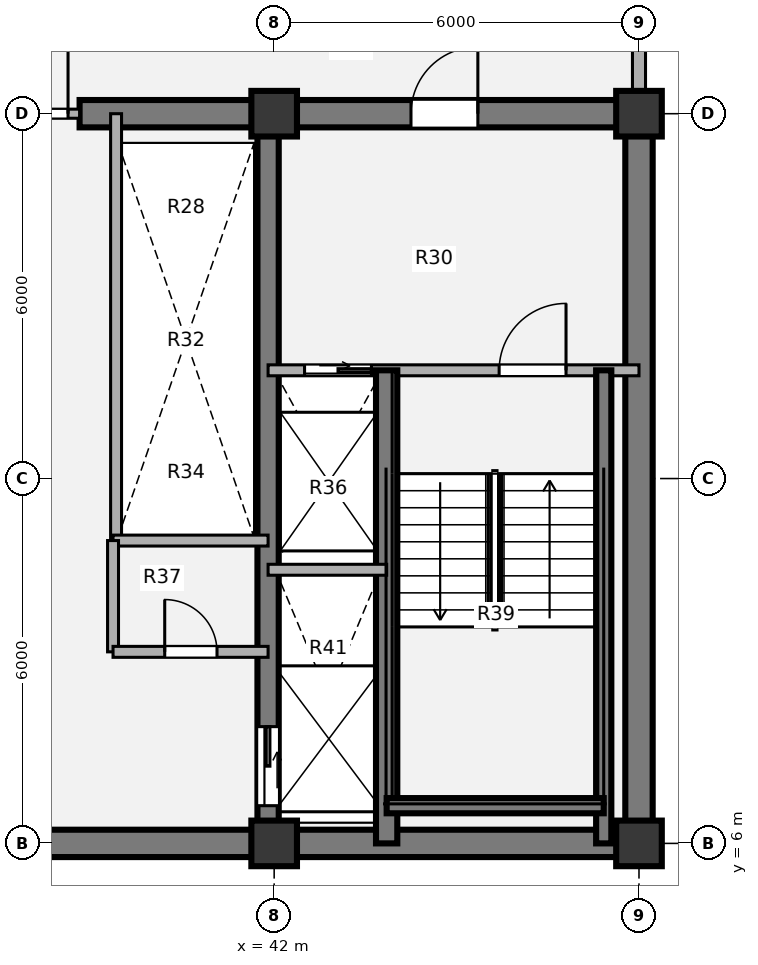
"""IFC4 building model, lengths in metres.
Left out: names, types, materials, properties, quantities, classifications, styles, units other than length and angle.
Written with IfcOpenShell. Run it as: python <this file> out.ifc"""

import sys

from ifc_helpers import new_model, si_unit, direction, frame, frame_2d, origin, origin_2d, place, context, subcontext, project, spatial, rectangle, extrude, source, transform, mapped, element, fill, save


model = new_model("IFC4")
c1 = context("Model", 3, precision=1e-05, world=origin(), true_north=direction((0.0, 1.0)))
c2 = subcontext(c1, "Body", "Model", "MODEL_VIEW")
j1 = project(units=[si_unit("LENGTHUNIT", "METRE"), si_unit("PLANEANGLEUNIT", "RADIAN")], contexts=[c1])
p1 = place(None, origin())
s1 = spatial("IfcSite", under=j1, at=p1, CompositionType="ELEMENT")
p2 = place(p1, origin())
s2 = spatial("IfcBuilding", under=s1, at=p2, CompositionType="ELEMENT")
p3 = place(p2, frame((0.0, 0.0, 167.76)))
s3 = spatial("IfcBuildingStorey", under=s2, at=p3, CompositionType="ELEMENT", Elevation=167.76)
m1 = source(origin(), c2, "Body", "SweptSolid", [
    extrude(rectangle(XDim=0.75, YDim=0.75, at=origin_2d()), origin(), (0.0, 0.0, 1.0), 3.78),
])
for number, where, z_axis, x_axis in (
    (1, (42.0, 6.0, 0.0), (0.0, 0.0, 1.0), (1.0, 0.0, 0.0)),
    (2, (48.0, 6.0, 0.0), (0.0, 0.0, 1.0), (1.0, 0.0, 0.0)),
    (3, (42.0, 18.0, 0.0), (0.0, 0.0, 1.0), (1.0, 0.0, 0.0)),
    (4, (48.0, 18.0, 0.0), (0.0, 0.0, 1.0), (1.0, 0.0, 0.0)),
):
    element("IfcColumn", number, at=place(p3, frame(where, z_axis=z_axis, x_axis=x_axis)), inside=s3, PredefinedType="COLUMN", context=c2, shape_type="MappedRepresentation", body=[
        mapped(m1, transform((0.0, 0.0, 0.0), x_axis=(1.0, 0.0, 0.0), y_axis=(0.0, 1.0, 0.0), z_axis=(0.0, 0.0, 1.0), scale=1.0)),
    ])
p4 = place(p3, frame((48.225, 6.0, 0.0), z_axis=(0.0, 0.0, 1.0), x_axis=(-1.0, 0.0, 0.0)))
e5 = element("IfcWall", 5, at=p4, inside=s3, PredefinedType="SHEAR", context=c2, shape_type="SweptSolid", body=[
    extrude(rectangle(XDim=24.45, YDim=0.45, at=frame_2d((12.225, 0.0))), origin(), (0.0, 0.0, 1.0), 3.78),
])
p5 = place(p3, frame((48.0, 18.0, 0.0), z_axis=(0.0, 0.0, 1.0), x_axis=(0.0, -1.0, 0.0)))
e6 = element("IfcWall", 6, at=p5, inside=s3, PredefinedType="SHEAR", context=c2, shape_type="SweptSolid", body=[
    extrude(rectangle(XDim=12.0, YDim=0.45, at=frame_2d((6.0, 0.0))), origin(), (0.0, 0.0, 1.0), 3.78),
])
p6 = place(p3, frame((38.8, 18.0, 0.0), z_axis=(0.0, 0.0, 1.0), x_axis=(1.0, 0.0, 0.0)))
e7 = element("IfcWall", 7, at=p6, inside=s3, PredefinedType="SHEAR", context=c2, shape_type="SweptSolid", body=[
    extrude(rectangle(XDim=9.425, YDim=0.45, at=frame_2d((4.712, 0.0))), origin(), (0.0, 0.0, 1.0), 3.78),
])
p7 = place(p6, frame((5.45, 0.0, 0.0)))
e8 = element("IfcOpeningElement", 8, at=p7, cuts=e7, PredefinedType="OPENING", context=c2, shape_type="SweptSolid", body=[
    extrude(rectangle(XDim=1.1, YDim=2.1, at=origin_2d()), frame((0.55, 0.235, 1.05), z_axis=(0.0, -1.0, 0.0), x_axis=(1.0, 0.0, 0.0)), (0.0, 0.0, 1.0), 0.47),
])
p8 = place(p3, frame((41.9, 18.0, 0.0), z_axis=(0.0, 0.0, 1.0), x_axis=(0.0, -1.0, 0.0)))
e9 = element("IfcWall", 9, at=p8, inside=s3, PredefinedType="SHEAR", context=c2, shape_type="SweptSolid", body=[
    extrude(rectangle(XDim=12.0, YDim=0.35, at=frame_2d((6.0, 0.0))), origin(), (0.0, 0.0, 1.0), 3.78),
])
p9 = place(p8, frame((10.08, 0.0, 0.0)))
e10 = element("IfcOpeningElement", 10, at=p9, cuts=e9, PredefinedType="OPENING", context=c2, shape_type="SweptSolid", body=[
    extrude(rectangle(XDim=1.3, YDim=2.1, at=origin_2d()), frame((0.65, 0.185, 1.05), z_axis=(0.0, -1.0, 0.0), x_axis=(1.0, 0.0, 0.0)), (0.0, 0.0, 1.0), 0.37),
])
p10 = place(p3, frame((48.0, 21.05, 0.0), z_axis=(0.0, 0.0, 1.0), x_axis=(0.0, -1.0, 0.0)))
e11 = element("IfcWall", 11, at=p10, inside=s3, PredefinedType="SOLIDWALL", context=c2, shape_type="SweptSolid", body=[
    extrude(rectangle(XDim=2.695, YDim=0.215, at=frame_2d((1.348, 0.0))), origin(), (0.0, 0.0, 1.0), 2.718),
])
p11 = place(p3, frame((39.4, 11.0, 0.0), z_axis=(0.0, 0.0, 1.0), x_axis=(0.0, 1.0, 0.0)))
e12 = element("IfcWall", 12, at=p11, inside=s3, PredefinedType="PARTITIONING", context=c2, shape_type="SweptSolid", body=[
    extrude(rectangle(XDim=7.0, YDim=0.18, at=frame_2d((3.5, 0.0))), origin(), (0.0, 0.0, 1.0), 3.5),
])
p12 = place(p3, frame((39.35, 10.98, 0.0), z_axis=(0.0, 0.0, 1.0), x_axis=(1.0, 0.0, 0.0)))
e13 = element("IfcWall", 13, at=p12, inside=s3, PredefinedType="PARTITIONING", context=c2, shape_type="SweptSolid", body=[
    extrude(rectangle(XDim=2.55, YDim=0.18, at=frame_2d((1.275, 0.0))), origin(), (0.0, 0.0, 1.0), 3.5),
])
p13 = place(p3, frame((39.35, 9.15, 0.0), z_axis=(0.0, 0.0, 1.0), x_axis=(0.0, 1.0, 0.0)))
e14 = element("IfcWall", 14, at=p13, inside=s3, PredefinedType="PARTITIONING", context=c2, shape_type="SweptSolid", body=[
    extrude(rectangle(XDim=1.83, YDim=0.18, at=frame_2d((0.915, 0.0))), origin(), (0.0, 0.0, 1.0), 3.5),
])
p14 = place(p3, frame((39.35, 9.15, 0.0), z_axis=(0.0, 0.0, 1.0), x_axis=(1.0, 0.0, 0.0)))
e15 = element("IfcWall", 15, at=p14, inside=s3, PredefinedType="PARTITIONING", context=c2, shape_type="SweptSolid", body=[
    extrude(rectangle(XDim=2.55, YDim=0.18, at=frame_2d((1.275, 0.0))), origin(), (0.0, 0.0, 1.0), 3.5),
])
p15 = place(p14, frame((0.85, 0.0, 0.0)))
e16 = element("IfcOpeningElement", 16, at=p15, cuts=e15, PredefinedType="OPENING", context=c2, shape_type="SweptSolid", body=[
    extrude(rectangle(XDim=0.86, YDim=2.1, at=origin_2d()), frame((0.43, 0.1, 1.05), z_axis=(0.0, -1.0, 0.0), x_axis=(1.0, 0.0, 0.0)), (0.0, 0.0, 1.0), 0.2),
])
p16 = place(p3, frame((33.2, 18.0, 0.0), z_axis=(0.0, 0.0, 1.0), x_axis=(1.0, 0.0, 0.0)))
e17 = element("IfcWall", 17, at=p16, inside=s3, PredefinedType="PARTITIONING", context=c2, shape_type="SweptSolid", body=[
    extrude(rectangle(XDim=5.6, YDim=0.15, at=frame_2d((2.8, 0.0))), origin(), (0.0, 0.0, 1.0), 2.515),
])
p17 = place(p16, frame((0.19, 0.0, 0.0)))
e18 = element("IfcOpeningElement", 18, at=p17, cuts=e17, PredefinedType="OPENING", context=c2, shape_type="SweptSolid", body=[
    extrude(rectangle(XDim=1.1, YDim=2.1, at=origin_2d()), frame((0.55, 0.085, 1.05), z_axis=(0.0, -1.0, 0.0), x_axis=(1.0, 0.0, 0.0)), (0.0, 0.0, 1.0), 0.17),
])
p18 = place(p16, frame((4.31, 0.0, 0.0)))
e19 = element("IfcOpeningElement", 19, at=p18, cuts=e17, PredefinedType="OPENING", context=c2, shape_type="SweptSolid", body=[
    extrude(rectangle(XDim=1.1, YDim=2.1, at=origin_2d()), frame((0.55, 0.085, 1.05), z_axis=(0.0, -1.0, 0.0), x_axis=(1.0, 0.0, 0.0)), (0.0, 0.0, 1.0), 0.17),
])
p19 = place(p3, frame((41.9, 13.78, 0.0), z_axis=(0.0, 0.0, 1.0), x_axis=(1.0, 0.0, 0.0)))
e20 = element("IfcWall", 20, at=p19, inside=s3, PredefinedType="PARTITIONING", context=c2, shape_type="SweptSolid", body=[
    extrude(rectangle(XDim=6.1, YDim=0.18, at=frame_2d((3.05, 0.0))), origin(), (0.0, 0.0, 1.0), 3.5),
])
p20 = place(p19, frame((0.6, 0.0, 0.0)))
e21 = element("IfcOpeningElement", 21, at=p20, cuts=e20, PredefinedType="OPENING", context=c2, shape_type="SweptSolid", body=[
    extrude(rectangle(XDim=1.1, YDim=2.1, at=origin_2d()), frame((0.55, 0.1, 1.05), z_axis=(0.0, -1.0, 0.0), x_axis=(1.0, 0.0, 0.0)), (0.0, 0.0, 1.0), 0.2),
])
p21 = place(p19, frame((3.8, 0.0, 0.0)))
e22 = element("IfcOpeningElement", 22, at=p21, cuts=e20, PredefinedType="OPENING", context=c2, shape_type="SweptSolid", body=[
    extrude(rectangle(XDim=1.1, YDim=2.1, at=origin_2d()), frame((0.55, 0.1, 1.05), z_axis=(0.0, -1.0, 0.0), x_axis=(1.0, 0.0, 0.0)), (0.0, 0.0, 1.0), 0.2),
])
p22 = place(p3, frame((43.85, 6.0, 0.0), z_axis=(0.0, 0.0, 1.0), x_axis=(0.0, 1.0, 0.0)))
e23 = element("IfcWall", 23, at=p22, inside=s3, PredefinedType="SHEAR", context=c2, shape_type="SweptSolid", body=[
    extrude(rectangle(XDim=7.78, YDim=0.35, at=frame_2d((3.89, 0.0))), origin(), (0.0, 0.0, 1.0), 3.85),
])
p23 = place(p3, frame((47.42, 6.0, 0.0), z_axis=(0.0, 0.0, 1.0), x_axis=(0.0, 1.0, 0.0)))
e24 = element("IfcWall", 24, at=p23, inside=s3, PredefinedType="SHEAR", context=c2, shape_type="SweptSolid", body=[
    extrude(rectangle(XDim=7.78, YDim=0.25, at=frame_2d((3.89, 0.0))), origin(), (0.0, 0.0, 1.0), 3.85),
])
p24 = place(p3, frame((43.85, 6.62, 0.0), z_axis=(0.0, 0.0, 1.0), x_axis=(1.0, 0.0, 0.0)))
e25 = element("IfcWall", 25, at=p24, inside=s3, PredefinedType="SHEAR", context=c2, shape_type="SweptSolid", body=[
    extrude(rectangle(XDim=3.57, YDim=0.25, at=frame_2d((1.785, 0.0))), origin(), (0.0, 0.0, 1.0), 3.85),
])
p25 = place(p3, frame((41.9, 10.5, 0.0), z_axis=(0.0, 0.0, 1.0), x_axis=(1.0, 0.0, 0.0)))
e26 = element("IfcWall", 26, at=p25, inside=s3, PredefinedType="PARTITIONING", context=c2, shape_type="SweptSolid", body=[
    extrude(rectangle(XDim=1.95, YDim=0.18, at=frame_2d((0.975, 0.0))), origin(), (0.0, 0.0, 1.0), 3.5),
])
m2 = source(origin(), c2, "Body", "SweptSolid", [
    extrude(rectangle(XDim=0.86, YDim=2.1, at=origin_2d()), frame((0.43, 0.025, 1.05), z_axis=(0.0, -1.0, 0.0), x_axis=(1.0, 0.0, 0.0)), (0.0, 0.0, 1.0), 0.05),
])
p26 = place(p15, origin())
e27 = element("IfcDoor", 27, at=p26, inside=s3, OperationType="SINGLE_SWING_LEFT", PredefinedType="DOOR", context=c2, shape_type="MappedRepresentation", body=[
    mapped(m2, transform((0.0, 0.0, 0.0), x_axis=(1.0, 0.0, 0.0), y_axis=(0.0, 1.0, 0.0), z_axis=(0.0, 0.0, 1.0), scale=1.0)),
])
fill(e16, e27)
m3 = source(origin(), c2, "Body", "SweptSolid", [
    extrude(rectangle(XDim=1.1, YDim=2.1, at=origin_2d()), frame((0.55, 0.025, 1.05), z_axis=(0.0, -1.0, 0.0), x_axis=(1.0, 0.0, 0.0)), (0.0, 0.0, 1.0), 0.05),
])
p27 = place(p18, origin())
e28 = element("IfcDoor", 28, at=p27, inside=s3, OperationType="SINGLE_SWING_RIGHT", PredefinedType="DOOR", context=c2, shape_type="MappedRepresentation", body=[
    mapped(m3, transform((0.0, 0.0, 0.0), x_axis=(1.0, 0.0, 0.0), y_axis=(0.0, 1.0, 0.0), z_axis=(0.0, 0.0, 1.0), scale=1.0)),
])
fill(e19, e28)
m4 = source(origin(), c2, "Body", "SweptSolid", [
    extrude(rectangle(XDim=1.1, YDim=2.1, at=origin_2d()), frame((0.55, 0.025, 1.05), z_axis=(0.0, -1.0, 0.0), x_axis=(1.0, 0.0, 0.0)), (0.0, 0.0, 1.0), 0.05),
])
p28 = place(p20, origin())
e29 = element("IfcDoor", 29, at=p28, inside=s3, OperationType="SLIDING_TO_RIGHT", PredefinedType="DOOR", context=c2, shape_type="MappedRepresentation", body=[
    mapped(m4, transform((0.0, 0.0, 0.0), x_axis=(1.0, 0.0, 0.0), y_axis=(0.0, 1.0, 0.0), z_axis=(0.0, 0.0, 1.0), scale=1.0)),
])
fill(e21, e29)
m5 = source(origin(), c2, "Body", "SweptSolid", [
    extrude(rectangle(XDim=1.1, YDim=2.1, at=origin_2d()), frame((0.55, 0.025, 1.05), z_axis=(0.0, -1.0, 0.0), x_axis=(1.0, 0.0, 0.0)), (0.0, 0.0, 1.0), 0.05),
])
p29 = place(p21, origin())
e30 = element("IfcDoor", 30, at=p29, inside=s3, OperationType="SINGLE_SWING_RIGHT", PredefinedType="DOOR", context=c2, shape_type="MappedRepresentation", body=[
    mapped(m5, transform((0.0, 0.0, 0.0), x_axis=(1.0, 0.0, 0.0), y_axis=(0.0, 1.0, 0.0), z_axis=(0.0, 0.0, 1.0), scale=1.0)),
])
fill(e22, e30)
m6 = source(origin(), c2, "Body", "SweptSolid", [
    extrude(rectangle(XDim=1.3, YDim=2.1, at=origin_2d()), frame((0.65, 0.025, 1.05), z_axis=(0.0, -1.0, 0.0), x_axis=(1.0, 0.0, 0.0)), (0.0, 0.0, 1.0), 0.05),
])
p30 = place(p9, origin())
e31 = element("IfcDoor", 31, at=p30, inside=s3, OperationType="SLIDING_TO_LEFT", PredefinedType="DOOR", context=c2, shape_type="MappedRepresentation", body=[
    mapped(m6, transform((0.0, 0.0, 0.0), x_axis=(1.0, 0.0, 0.0), y_axis=(0.0, 1.0, 0.0), z_axis=(0.0, 0.0, 1.0), scale=1.0)),
])
fill(e10, e31)
p31 = place(p7, origin())
e32 = element("IfcDoor", 32, at=p31, inside=s3, OperationType="SINGLE_SWING_RIGHT", PredefinedType="DOOR", context=c2, shape_type="MappedRepresentation", body=[
    mapped(m3, transform((0.0, 0.0, 0.0), x_axis=(1.0, 0.0, 0.0), y_axis=(0.0, 1.0, 0.0), z_axis=(0.0, 0.0, 1.0), scale=1.0)),
])
fill(e8, e32)
save(model, sys.argv[1])
